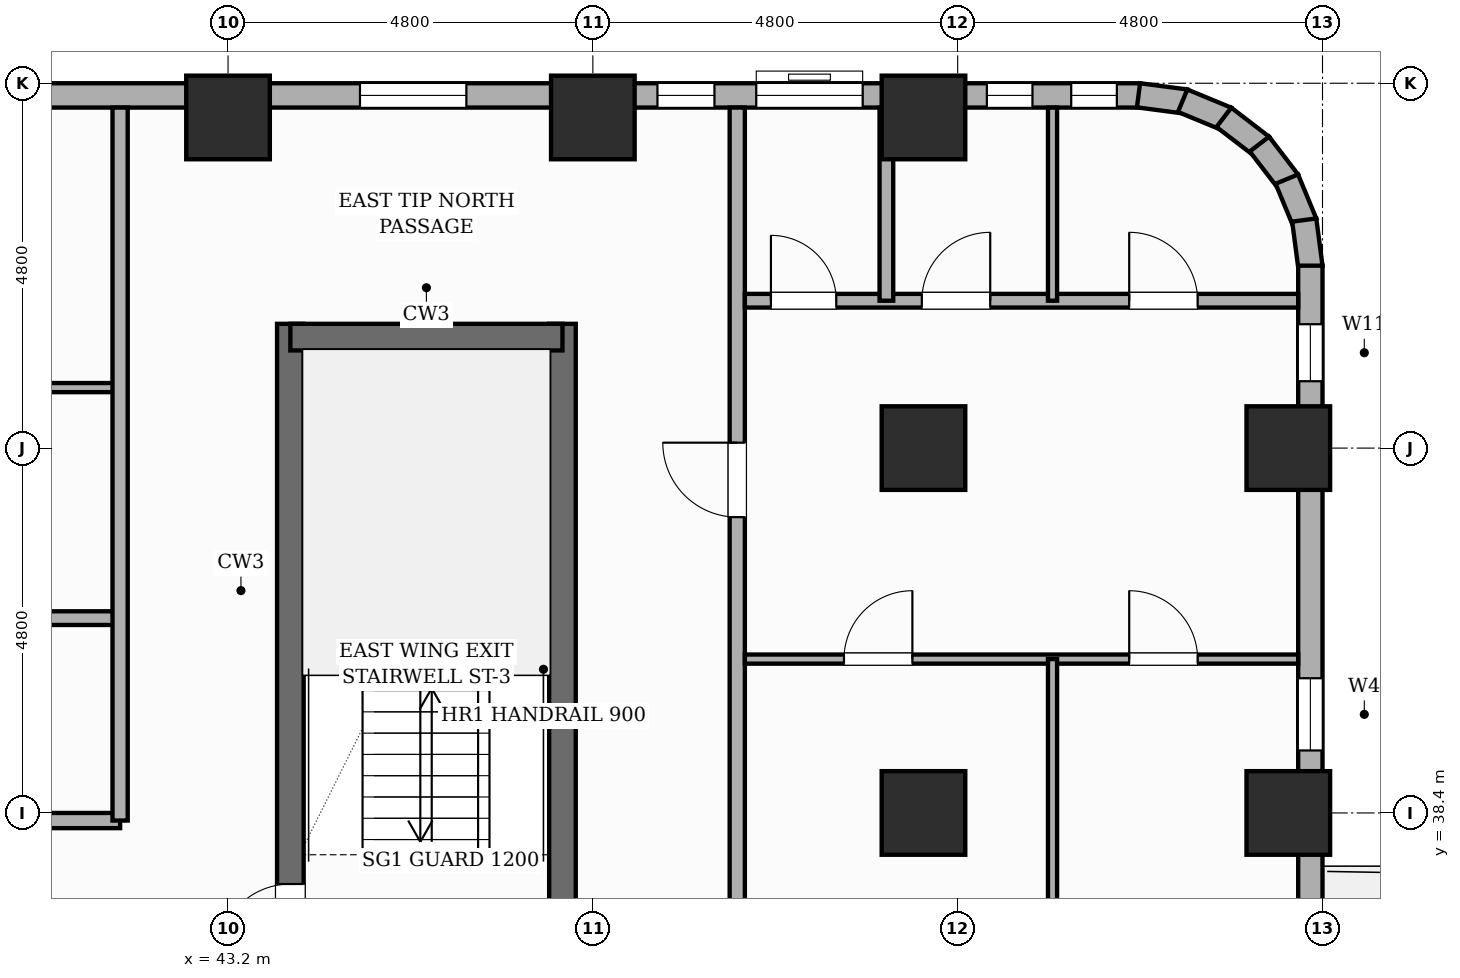
"""IFC4 building model, lengths in metres.
Left out: names, types, materials, properties, quantities, classifications, styles, units other than length and angle.
Written with IfcOpenShell. Run it as: python <this file> out.ifc"""

import sys

from ifc_helpers import new_model, si_unit, direction, frame, frame_2d, origin, origin_2d, place, context, subcontext, project, spatial, rectangle, extrude, element, fill, save


model = new_model("IFC4")
c1 = context("Model", 3, precision=1e-05, world=origin(), true_north=direction((0.0, 1.0)))
c2 = subcontext(c1, "Body", "Model", "MODEL_VIEW")
j1 = project(units=[si_unit("LENGTHUNIT", "METRE"), si_unit("PLANEANGLEUNIT", "RADIAN")], contexts=[c1])
p1 = place(None, origin())
s1 = spatial("IfcSite", under=j1, at=p1, CompositionType="ELEMENT")
p2 = place(p1, origin())
s2 = spatial("IfcBuilding", under=s1, at=p2, CompositionType="ELEMENT")
p3 = place(p2, frame((0.0, 0.0, 46.6)))
s3 = spatial("IfcBuildingStorey", under=s2, at=p3, CompositionType="ELEMENT", Elevation=46.6)
p4 = place(p3, frame((44.02, 35.865, 0.0), z_axis=(0.0, 0.0, 1.0), x_axis=(0.0, 1.0, 0.0)))
e1 = element("IfcWall", 1, at=p4, inside=s3, PredefinedType="SHEAR", context=c2, shape_type="SweptSolid", body=[
    extrude(rectangle(XDim=8.97, YDim=0.35, at=frame_2d((4.485, 0.0))), origin(), (0.0, 0.0, 1.0), 3.6),
])
p5 = place(p4, frame((0.65, 0.0, 0.0)))
e2 = element("IfcOpeningElement", 2, at=p5, cuts=e1, PredefinedType="OPENING", context=c2, shape_type="SweptSolid", body=[
    extrude(rectangle(XDim=0.95, YDim=2.1, at=frame_2d((0.475, 1.05))), frame((0.0, 0.185, 0.0), z_axis=(0.0, -1.0, 0.0), x_axis=(1.0, 0.0, 0.0)), (0.0, 0.0, 1.0), 0.37),
])
p6 = place(p3, frame((47.6, 35.865, 0.0), z_axis=(0.0, 0.0, 1.0), x_axis=(0.0, 1.0, 0.0)))
e3 = element("IfcWall", 3, at=p6, inside=s3, PredefinedType="SHEAR", context=c2, shape_type="SweptSolid", body=[
    extrude(rectangle(XDim=8.97, YDim=0.35, at=frame_2d((4.485, 0.0))), origin(), (0.0, 0.0, 1.0), 3.6),
])
p7 = place(p3, frame((44.02, 44.66, 0.0), z_axis=(0.0, 0.0, 1.0), x_axis=(1.0, 0.0, 0.0)))
e4 = element("IfcWall", 4, at=p7, inside=s3, PredefinedType="SHEAR", context=c2, shape_type="SweptSolid", body=[
    extrude(rectangle(XDim=3.58, YDim=0.35, at=frame_2d((1.79, 0.0))), origin(), (0.0, 0.0, 1.0), 3.6),
])
for number, where, z_axis, x_axis in (
    (5, (43.2, 47.55, 0.0), (0.0, 0.0, 1.0), (1.0, 0.0, 0.0)),
    (6, (48.0, 47.55, 0.0), (0.0, 0.0, 1.0), (1.0, 0.0, 0.0)),
    (7, (52.35, 38.4, 0.0), (0.0, 0.0, 1.0), (1.0, 0.0, 0.0)),
    (8, (52.35, 43.2, 0.0), (0.0, 0.0, 1.0), (1.0, 0.0, 0.0)),
    (9, (52.35, 47.55, 0.0), (0.0, 0.0, 1.0), (1.0, 0.0, 0.0)),
    (10, (57.15, 38.4, 0.0), (0.0, 0.0, 1.0), (1.0, 0.0, 0.0)),
    (11, (57.15, 43.2, 0.0), (0.0, 0.0, 1.0), (1.0, 0.0, 0.0)),
):
    element("IfcColumn", number, at=place(p3, frame(where, z_axis=z_axis, x_axis=x_axis)), inside=s3, PredefinedType="COLUMN", context=c2, shape_type="SweptSolid", body=[
        extrude(rectangle(XDim=1.1, YDim=1.1, at=origin_2d()), origin(), (0.0, 0.0, 1.0), 3.6),
    ])
p8 = place(p3, frame((7.2, 47.84, 0.0), z_axis=(0.0, 0.0, 1.0), x_axis=(1.0, 0.0, 0.0)))
e12 = element("IfcWall", 12, at=p8, inside=s3, PredefinedType="STANDARD", context=c2, shape_type="SweptSolid", body=[
    extrude(rectangle(XDim=48.0, YDim=0.32, at=frame_2d((24.0, 0.0))), origin(), (0.0, 0.0, 1.0), 2.53),
])
p9 = place(p8, frame((28.803, 0.0, 0.65)))
e13 = element("IfcOpeningElement", 13, at=p9, cuts=e12, PredefinedType="OPENING", context=c2, shape_type="SweptSolid", body=[
    extrude(rectangle(XDim=1.4, YDim=1.1, at=frame_2d((0.7, 0.55))), frame((0.0, 0.17, 0.0), z_axis=(0.0, -1.0, 0.0), x_axis=(1.0, 0.0, 0.0)), (0.0, 0.0, 1.0), 0.34),
])
p10 = place(p8, frame((47.094, 0.0, 0.45)))
e14 = element("IfcOpeningElement", 14, at=p10, cuts=e12, PredefinedType="OPENING", context=c2, shape_type="SweptSolid", body=[
    extrude(rectangle(XDim=0.6, YDim=1.8, at=frame_2d((0.3, 0.9))), frame((0.0, 0.17, 0.0), z_axis=(0.0, -1.0, 0.0), x_axis=(1.0, 0.0, 0.0)), (0.0, 0.0, 1.0), 0.34),
])
p11 = place(p8, frame((18.74, 0.0, 0.45)))
e15 = element("IfcOpeningElement", 15, at=p11, cuts=e12, PredefinedType="OPENING", context=c2, shape_type="SweptSolid", body=[
    extrude(rectangle(XDim=0.95, YDim=1.8, at=frame_2d((0.475, 0.9))), frame((0.0, 0.17, 0.0), z_axis=(0.0, -1.0, 0.0), x_axis=(1.0, 0.0, 0.0)), (0.0, 0.0, 1.0), 0.34),
])
p12 = place(p8, frame((41.65, 0.0, 0.45)))
e16 = element("IfcOpeningElement", 16, at=p12, cuts=e12, PredefinedType="OPENING", context=c2, shape_type="SweptSolid", body=[
    extrude(rectangle(XDim=0.75, YDim=1.8, at=frame_2d((0.375, 0.9))), frame((0.0, 0.17, 0.0), z_axis=(0.0, -1.0, 0.0), x_axis=(1.0, 0.0, 0.0)), (0.0, 0.0, 1.0), 0.34),
])
p13 = place(p8, frame((37.736, 0.0, 0.65)))
e17 = element("IfcOpeningElement", 17, at=p13, cuts=e12, PredefinedType="OPENING", context=c2, shape_type="SweptSolid", body=[
    extrude(rectangle(XDim=1.4, YDim=1.1, at=frame_2d((0.7, 0.55))), frame((0.0, 0.17, 0.0), z_axis=(0.0, -1.0, 0.0), x_axis=(1.0, 0.0, 0.0)), (0.0, 0.0, 1.0), 0.34),
])
p14 = place(p8, frame((0.47, 0.0, 0.45)))
e18 = element("IfcOpeningElement", 18, at=p14, cuts=e12, PredefinedType="OPENING", context=c2, shape_type="SweptSolid", body=[
    extrude(rectangle(XDim=0.95, YDim=1.8, at=frame_2d((0.475, 0.9))), frame((0.0, 0.17, 0.0), z_axis=(0.0, -1.0, 0.0), x_axis=(1.0, 0.0, 0.0)), (0.0, 0.0, 1.0), 0.34),
])
p15 = place(p8, frame((10.215, 0.0, 0.45)))
e19 = element("IfcOpeningElement", 19, at=p15, cuts=e12, PredefinedType="OPENING", context=c2, shape_type="SweptSolid", body=[
    extrude(rectangle(XDim=0.95, YDim=1.8, at=frame_2d((0.475, 0.9))), frame((0.0, 0.17, 0.0), z_axis=(0.0, -1.0, 0.0), x_axis=(1.0, 0.0, 0.0)), (0.0, 0.0, 1.0), 0.34),
])
p16 = place(p8, frame((23.43, 0.0, 0.65)))
e20 = element("IfcOpeningElement", 20, at=p16, cuts=e12, PredefinedType="OPENING", context=c2, shape_type="SweptSolid", body=[
    extrude(rectangle(XDim=1.4, YDim=1.1, at=frame_2d((0.7, 0.55))), frame((0.0, 0.17, 0.0), z_axis=(0.0, -1.0, 0.0), x_axis=(1.0, 0.0, 0.0)), (0.0, 0.0, 1.0), 0.34),
])
p17 = place(p8, frame((42.95, 0.0, 0.65)))
e21 = element("IfcOpeningElement", 21, at=p17, cuts=e12, PredefinedType="OPENING", context=c2, shape_type="SweptSolid", body=[
    extrude(rectangle(XDim=1.4, YDim=1.1, at=frame_2d((0.7, 0.55))), frame((0.0, 0.17, 0.0), z_axis=(0.0, -1.0, 0.0), x_axis=(1.0, 0.0, 0.0)), (0.0, 0.0, 1.0), 0.34),
])
p18 = place(p8, frame((45.984, 0.0, 0.45)))
e22 = element("IfcOpeningElement", 22, at=p18, cuts=e12, PredefinedType="OPENING", context=c2, shape_type="SweptSolid", body=[
    extrude(rectangle(XDim=0.6, YDim=1.8, at=frame_2d((0.3, 0.9))), frame((0.0, 0.17, 0.0), z_axis=(0.0, -1.0, 0.0), x_axis=(1.0, 0.0, 0.0)), (0.0, 0.0, 1.0), 0.34),
])
for number, where, z_axis, x_axis in (
    (23, (55.179, 47.841, 0.0), (0.0, 0.0, 1.0), (0.991, -0.131, 0.0)),
    (24, (55.76, 47.771, 0.0), (0.0, 0.0, 1.0), (0.924, -0.383, 0.0)),
):
    element("IfcWall", number, at=place(p3, frame(where, z_axis=z_axis, x_axis=x_axis)), inside=s3, PredefinedType="STANDARD", context=c2, shape_type="SweptSolid", body=[
        extrude(rectangle(XDim=0.626, YDim=0.32, at=frame_2d((0.313, 0.0))), origin(), (0.0, 0.0, 1.0), 3.35),
    ])
p19 = place(p3, frame((56.302, 47.552, 0.0), z_axis=(0.0, 0.0, 1.0), x_axis=(0.793549926411, -0.608505147302, 0.0)))
e25 = element("IfcWall", 25, at=p19, inside=s3, PredefinedType="STANDARD", context=c2, shape_type="SweptSolid", body=[
    extrude(rectangle(XDim=0.627, YDim=0.32, at=frame_2d((0.313, 0.0))), origin(), (0.0, 0.0, 1.0), 3.35),
])
for number, where, z_axis, x_axis in (
    (26, (56.77, 47.2, 0.0), (0.0, 0.0, 1.0), (0.609, -0.793, 0.0)),
    (27, (57.131, 46.739, 0.0), (0.0, 0.0, 1.0), (0.383, -0.924, 0.0)),
    (28, (57.36, 46.2, 0.0), (0.0, 0.0, 1.0), (0.131, -0.991, 0.0)),
):
    element("IfcWall", number, at=place(p3, frame(where, z_axis=z_axis, x_axis=x_axis)), inside=s3, PredefinedType="STANDARD", context=c2, shape_type="SweptSolid", body=[
        extrude(rectangle(XDim=0.626, YDim=0.32, at=frame_2d((0.313, 0.0))), origin(), (0.0, 0.0, 1.0), 3.35),
    ])
p20 = place(p3, frame((57.44, 45.6, 0.0), z_axis=(0.0, 0.0, 1.0), x_axis=(0.0, -1.0, 0.0)))
e29 = element("IfcWall", 29, at=p20, inside=s3, PredefinedType="STANDARD", context=c2, shape_type="SweptSolid", body=[
    extrude(rectangle(XDim=14.4, YDim=0.32, at=frame_2d((7.2, 0.0))), origin(), (0.0, 0.0, 1.0), 2.53),
])
p21 = place(p20, frame((9.8, 0.0, 0.0)))
e30 = element("IfcOpeningElement", 30, at=p21, cuts=e29, PredefinedType="OPENING", context=c2, shape_type="SweptSolid", body=[
    extrude(rectangle(XDim=1.1, YDim=2.15, at=frame_2d((0.55, 1.075))), frame((0.0, 0.17, 0.0), z_axis=(0.0, -1.0, 0.0), x_axis=(1.0, 0.0, 0.0)), (0.0, 0.0, 1.0), 0.34),
])
p22 = place(p20, frame((5.428, 0.0, 0.45)))
e31 = element("IfcOpeningElement", 31, at=p22, cuts=e29, PredefinedType="OPENING", context=c2, shape_type="SweptSolid", body=[
    extrude(rectangle(XDim=0.95, YDim=1.8, at=frame_2d((0.475, 0.9))), frame((0.0, 0.17, 0.0), z_axis=(0.0, -1.0, 0.0), x_axis=(1.0, 0.0, 0.0)), (0.0, 0.0, 1.0), 0.34),
])
p23 = place(p20, frame((12.98, 0.0, 0.45)))
e32 = element("IfcOpeningElement", 32, at=p23, cuts=e29, PredefinedType="OPENING", context=c2, shape_type="SweptSolid", body=[
    extrude(rectangle(XDim=0.95, YDim=1.8, at=frame_2d((0.475, 0.9))), frame((0.0, 0.17, 0.0), z_axis=(0.0, -1.0, 0.0), x_axis=(1.0, 0.0, 0.0)), (0.0, 0.0, 1.0), 0.34),
])
p24 = place(p20, frame((0.771, 0.0, 0.45)))
e33 = element("IfcOpeningElement", 33, at=p24, cuts=e29, PredefinedType="OPENING", context=c2, shape_type="SweptSolid", body=[
    extrude(rectangle(XDim=0.75, YDim=1.8, at=frame_2d((0.375, 0.9))), frame((0.0, 0.17, 0.0), z_axis=(0.0, -1.0, 0.0), x_axis=(1.0, 0.0, 0.0)), (0.0, 0.0, 1.0), 0.34),
])
p25 = place(p3, frame((27.35, 38.3, 0.0), z_axis=(0.0, 0.0, 1.0), x_axis=(1.0, 0.0, 0.0)))
e34 = element("IfcWall", 34, at=p25, inside=s3, PredefinedType="PARTITIONING", context=c2, shape_type="SweptSolid", body=[
    extrude(rectangle(XDim=14.43, YDim=0.2, at=frame_2d((7.215, 0.0))), origin(), (0.0, 0.0, 1.0), 3.35),
])
p26 = place(p25, frame((4.803, 0.0, 0.0)))
e35 = element("IfcOpeningElement", 35, at=p26, cuts=e34, PredefinedType="OPENING", context=c2, shape_type="SweptSolid", body=[
    extrude(rectangle(XDim=0.98, YDim=2.18, at=frame_2d((0.49, 1.09))), frame((0.0, 0.11, 0.0), z_axis=(0.0, -1.0, 0.0), x_axis=(1.0, 0.0, 0.0)), (0.0, 0.0, 1.0), 0.22),
])
p27 = place(p3, frame((35.577, 40.963, 0.0), z_axis=(0.0, 0.0, 1.0), x_axis=(1.0, 0.0, 0.0)))
e36 = element("IfcWall", 36, at=p27, inside=s3, PredefinedType="PLUMBINGWALL", context=c2, shape_type="SweptSolid", body=[
    extrude(rectangle(XDim=6.123, YDim=0.18, at=frame_2d((3.062, 0.0))), origin(), (0.0, 0.0, 1.0), 3.35),
])
p28 = place(p3, frame((35.577, 43.996, 0.0), z_axis=(0.0, 0.0, 1.0), x_axis=(1.0, 0.0, 0.0)))
e37 = element("IfcWall", 37, at=p28, inside=s3, PredefinedType="PARTITIONING", context=c2, shape_type="SweptSolid", body=[
    extrude(rectangle(XDim=6.123, YDim=0.12, at=frame_2d((3.062, 0.0))), origin(), (0.0, 0.0, 1.0), 3.35),
])
p29 = place(p3, frame((41.78, 38.3, 0.0), z_axis=(0.0, 0.0, 1.0), x_axis=(0.0, 1.0, 0.0)))
e38 = element("IfcWall", 38, at=p29, inside=s3, PredefinedType="PARTITIONING", context=c2, shape_type="SweptSolid", body=[
    extrude(rectangle(XDim=9.38, YDim=0.2, at=frame_2d((4.69, 0.0))), origin(), (0.0, 0.0, 1.0), 3.35),
])
p30 = place(p3, frame((49.9, 36.04, 0.0), z_axis=(0.0, 0.0, 1.0), x_axis=(0.0, 1.0, 0.0)))
e39 = element("IfcWall", 39, at=p30, inside=s3, PredefinedType="PARTITIONING", context=c2, shape_type="SweptSolid", body=[
    extrude(rectangle(XDim=11.64, YDim=0.2, at=frame_2d((5.82, 0.0))), origin(), (0.0, 0.0, 1.0), 3.35),
])
p31 = place(p30, frame((6.251, 0.0, 0.0)))
e40 = element("IfcOpeningElement", 40, at=p31, cuts=e39, PredefinedType="OPENING", context=c2, shape_type="SweptSolid", body=[
    extrude(rectangle(XDim=0.98, YDim=2.18, at=frame_2d((0.49, 1.09))), frame((0.0, 0.11, 0.0), z_axis=(0.0, -1.0, 0.0), x_axis=(1.0, 0.0, 0.0)), (0.0, 0.0, 1.0), 0.22),
])
p32 = place(p3, frame((50.0, 45.139, 0.0), z_axis=(0.0, 0.0, 1.0), x_axis=(1.0, 0.0, 0.0)))
e41 = element("IfcWall", 41, at=p32, inside=s3, PredefinedType="PLUMBINGWALL", context=c2, shape_type="SweptSolid", body=[
    extrude(rectangle(XDim=7.28, YDim=0.18, at=frame_2d((3.64, 0.0))), origin(), (0.0, 0.0, 1.0), 3.35),
])
p33 = place(p32, frame((0.343, 0.0, 0.0)))
e42 = element("IfcOpeningElement", 42, at=p33, cuts=e41, PredefinedType="OPENING", context=c2, shape_type="SweptSolid", body=[
    extrude(rectangle(XDim=0.86, YDim=2.1, at=frame_2d((0.43, 1.05))), frame((0.0, 0.1, 0.0), z_axis=(0.0, -1.0, 0.0), x_axis=(1.0, 0.0, 0.0)), (0.0, 0.0, 1.0), 0.2),
])
p34 = place(p32, frame((2.328, 0.0, 0.0)))
e43 = element("IfcOpeningElement", 43, at=p34, cuts=e41, PredefinedType="OPENING", context=c2, shape_type="SweptSolid", body=[
    extrude(rectangle(XDim=0.9, YDim=2.15, at=frame_2d((0.45, 1.075))), frame((0.0, 0.1, 0.0), z_axis=(0.0, -1.0, 0.0), x_axis=(1.0, 0.0, 0.0)), (0.0, 0.0, 1.0), 0.2),
])
p35 = place(p32, frame((5.057, 0.0, 0.0)))
e44 = element("IfcOpeningElement", 44, at=p35, cuts=e41, PredefinedType="OPENING", context=c2, shape_type="SweptSolid", body=[
    extrude(rectangle(XDim=0.9, YDim=2.15, at=frame_2d((0.45, 1.075))), frame((0.0, 0.1, 0.0), z_axis=(0.0, -1.0, 0.0), x_axis=(1.0, 0.0, 0.0)), (0.0, 0.0, 1.0), 0.2),
])
p36 = place(p3, frame((50.0, 40.424, 0.0), z_axis=(0.0, 0.0, 1.0), x_axis=(1.0, 0.0, 0.0)))
e45 = element("IfcWall", 45, at=p36, inside=s3, PredefinedType="PARTITIONING", context=c2, shape_type="SweptSolid", body=[
    extrude(rectangle(XDim=7.28, YDim=0.12, at=frame_2d((3.64, 0.0))), origin(), (0.0, 0.0, 1.0), 3.35),
])
p37 = place(p36, frame((1.304, 0.0, 0.0)))
e46 = element("IfcOpeningElement", 46, at=p37, cuts=e45, PredefinedType="OPENING", context=c2, shape_type="SweptSolid", body=[
    extrude(rectangle(XDim=0.9, YDim=2.15, at=frame_2d((0.45, 1.075))), frame((0.0, 0.07, 0.0), z_axis=(0.0, -1.0, 0.0), x_axis=(1.0, 0.0, 0.0)), (0.0, 0.0, 1.0), 0.14),
])
p38 = place(p36, frame((5.057, 0.0, 0.0)))
e47 = element("IfcOpeningElement", 47, at=p38, cuts=e45, PredefinedType="OPENING", context=c2, shape_type="SweptSolid", body=[
    extrude(rectangle(XDim=0.9, YDim=2.15, at=frame_2d((0.45, 1.075))), frame((0.0, 0.07, 0.0), z_axis=(0.0, -1.0, 0.0), x_axis=(1.0, 0.0, 0.0)), (0.0, 0.0, 1.0), 0.14),
])
p39 = place(p3, frame((54.048, 36.04, 0.0), z_axis=(0.0, 0.0, 1.0), x_axis=(0.0, 1.0, 0.0)))
e48 = element("IfcWall", 48, at=p39, inside=s3, PredefinedType="PARTITIONING", context=c2, shape_type="SweptSolid", body=[
    extrude(rectangle(XDim=4.384, YDim=0.12, at=frame_2d((2.192, 0.0))), origin(), (0.0, 0.0, 1.0), 3.35),
])
p40 = place(p3, frame((51.862, 45.139, 0.0), z_axis=(0.0, 0.0, 1.0), x_axis=(0.0, 1.0, 0.0)))
e49 = element("IfcWall", 49, at=p40, inside=s3, PredefinedType="PLUMBINGWALL", context=c2, shape_type="SweptSolid", body=[
    extrude(rectangle(XDim=2.541, YDim=0.18, at=frame_2d((1.271, 0.0))), origin(), (0.0, 0.0, 1.0), 3.35),
])
p41 = place(p3, frame((54.048, 45.139, 0.0), z_axis=(0.0, 0.0, 1.0), x_axis=(0.0, 1.0, 0.0)))
e50 = element("IfcWall", 50, at=p41, inside=s3, PredefinedType="PARTITIONING", context=c2, shape_type="SweptSolid", body=[
    extrude(rectangle(XDim=2.541, YDim=0.12, at=frame_2d((1.271, 0.0))), origin(), (0.0, 0.0, 1.0), 3.35),
])
p42 = place(p10, origin())
e51 = element("IfcWindow", 51, at=p42, inside=s3, PartitioningType="SINGLE_PANEL", PredefinedType="WINDOW", context=c2, shape_type="SweptSolid", body=[
    extrude(rectangle(XDim=0.6, YDim=1.8, at=frame_2d((0.3, 0.9))), frame((0.0, 0.03, 0.0), z_axis=(0.0, -1.0, 0.0), x_axis=(1.0, 0.0, 0.0)), (0.0, 0.0, 1.0), 0.06),
])
fill(e14, e51)
p43 = place(p12, origin())
e52 = element("IfcWindow", 52, at=p43, inside=s3, PartitioningType="SINGLE_PANEL", PredefinedType="WINDOW", context=c2, shape_type="SweptSolid", body=[
    extrude(rectangle(XDim=0.75, YDim=1.8, at=frame_2d((0.375, 0.9))), frame((0.0, 0.03, 0.0), z_axis=(0.0, -1.0, 0.0), x_axis=(1.0, 0.0, 0.0)), (0.0, 0.0, 1.0), 0.06),
])
fill(e16, e52)
p44 = place(p13, origin())
e53 = element("IfcWindow", 53, at=p44, inside=s3, PartitioningType="SINGLE_PANEL", PredefinedType="WINDOW", context=c2, shape_type="SweptSolid", body=[
    extrude(rectangle(XDim=1.4, YDim=1.1, at=frame_2d((0.7, 0.55))), frame((0.0, 0.03, 0.0), z_axis=(0.0, -1.0, 0.0), x_axis=(1.0, 0.0, 0.0)), (0.0, 0.0, 1.0), 0.06),
])
fill(e17, e53)
p45 = place(p17, origin())
e54 = element("IfcWindow", 54, at=p45, inside=s3, PartitioningType="SINGLE_PANEL", PredefinedType="WINDOW", context=c2, shape_type="SweptSolid", body=[
    extrude(rectangle(XDim=1.4, YDim=1.1, at=frame_2d((0.7, 0.55))), frame((0.0, 0.03, 0.0), z_axis=(0.0, -1.0, 0.0), x_axis=(1.0, 0.0, 0.0)), (0.0, 0.0, 1.0), 0.06),
])
fill(e21, e54)
p46 = place(p18, origin())
e55 = element("IfcWindow", 55, at=p46, inside=s3, PartitioningType="SINGLE_PANEL", PredefinedType="WINDOW", context=c2, shape_type="SweptSolid", body=[
    extrude(rectangle(XDim=0.6, YDim=1.8, at=frame_2d((0.3, 0.9))), frame((0.0, 0.03, 0.0), z_axis=(0.0, -1.0, 0.0), x_axis=(1.0, 0.0, 0.0)), (0.0, 0.0, 1.0), 0.06),
])
fill(e22, e55)
p47 = place(p22, origin())
e56 = element("IfcWindow", 56, at=p47, inside=s3, PartitioningType="SINGLE_PANEL", PredefinedType="WINDOW", context=c2, shape_type="SweptSolid", body=[
    extrude(rectangle(XDim=0.95, YDim=1.8, at=frame_2d((0.475, 0.9))), frame((0.0, 0.03, 0.0), z_axis=(0.0, -1.0, 0.0), x_axis=(1.0, 0.0, 0.0)), (0.0, 0.0, 1.0), 0.06),
])
fill(e31, e56)
p48 = place(p24, origin())
e57 = element("IfcWindow", 57, at=p48, inside=s3, PartitioningType="SINGLE_PANEL", PredefinedType="WINDOW", context=c2, shape_type="SweptSolid", body=[
    extrude(rectangle(XDim=0.75, YDim=1.8, at=frame_2d((0.375, 0.9))), frame((0.0, 0.03, 0.0), z_axis=(0.0, -1.0, 0.0), x_axis=(1.0, 0.0, 0.0)), (0.0, 0.0, 1.0), 0.06),
])
fill(e33, e57)
p49 = place(p5, origin())
e58 = element("IfcDoor", 58, at=p49, inside=s3, OperationType="SINGLE_SWING_LEFT", PredefinedType="DOOR", context=c2, shape_type="SweptSolid", body=[
    extrude(rectangle(XDim=0.95, YDim=2.1, at=frame_2d((0.475, 1.05))), frame((0.0, 0.025, 0.0), z_axis=(0.0, -1.0, 0.0), x_axis=(1.0, 0.0, 0.0)), (0.0, 0.0, 1.0), 0.05),
])
fill(e2, e58)
p50 = place(p31, origin())
e59 = element("IfcDoor", 59, at=p50, inside=s3, OperationType="SINGLE_SWING_RIGHT", PredefinedType="DOOR", context=c2, shape_type="SweptSolid", body=[
    extrude(rectangle(XDim=0.98, YDim=2.18, at=frame_2d((0.49, 1.09))), frame((0.0, 0.025, 0.0), z_axis=(0.0, -1.0, 0.0), x_axis=(1.0, 0.0, 0.0)), (0.0, 0.0, 1.0), 0.05),
])
fill(e40, e59)
p51 = place(p37, origin())
e60 = element("IfcDoor", 60, at=p51, inside=s3, OperationType="SINGLE_SWING_RIGHT", PredefinedType="DOOR", context=c2, shape_type="SweptSolid", body=[
    extrude(rectangle(XDim=0.9, YDim=2.15, at=frame_2d((0.45, 1.075))), frame((0.0, 0.025, 0.0), z_axis=(0.0, -1.0, 0.0), x_axis=(1.0, 0.0, 0.0)), (0.0, 0.0, 1.0), 0.05),
])
fill(e46, e60)
p52 = place(p38, origin())
e61 = element("IfcDoor", 61, at=p52, inside=s3, OperationType="SINGLE_SWING_LEFT", PredefinedType="DOOR", context=c2, shape_type="SweptSolid", body=[
    extrude(rectangle(XDim=0.9, YDim=2.15, at=frame_2d((0.45, 1.075))), frame((0.0, 0.025, 0.0), z_axis=(0.0, -1.0, 0.0), x_axis=(1.0, 0.0, 0.0)), (0.0, 0.0, 1.0), 0.05),
])
fill(e47, e61)
p53 = place(p33, origin())
e62 = element("IfcDoor", 62, at=p53, inside=s3, OperationType="SINGLE_SWING_LEFT", PredefinedType="DOOR", context=c2, shape_type="SweptSolid", body=[
    extrude(rectangle(XDim=0.86, YDim=2.1, at=frame_2d((0.43, 1.05))), frame((0.0, 0.025, 0.0), z_axis=(0.0, -1.0, 0.0), x_axis=(1.0, 0.0, 0.0)), (0.0, 0.0, 1.0), 0.05),
])
fill(e42, e62)
p54 = place(p34, origin())
e63 = element("IfcDoor", 63, at=p54, inside=s3, OperationType="SINGLE_SWING_RIGHT", PredefinedType="DOOR", context=c2, shape_type="SweptSolid", body=[
    extrude(rectangle(XDim=0.9, YDim=2.15, at=frame_2d((0.45, 1.075))), frame((0.0, 0.025, 0.0), z_axis=(0.0, -1.0, 0.0), x_axis=(1.0, 0.0, 0.0)), (0.0, 0.0, 1.0), 0.05),
])
fill(e43, e63)
p55 = place(p35, origin())
e64 = element("IfcDoor", 64, at=p55, inside=s3, OperationType="SINGLE_SWING_LEFT", PredefinedType="DOOR", context=c2, shape_type="SweptSolid", body=[
    extrude(rectangle(XDim=0.9, YDim=2.15, at=frame_2d((0.45, 1.075))), frame((0.0, 0.025, 0.0), z_axis=(0.0, -1.0, 0.0), x_axis=(1.0, 0.0, 0.0)), (0.0, 0.0, 1.0), 0.05),
])
fill(e44, e64)
save(model, sys.argv[1])
